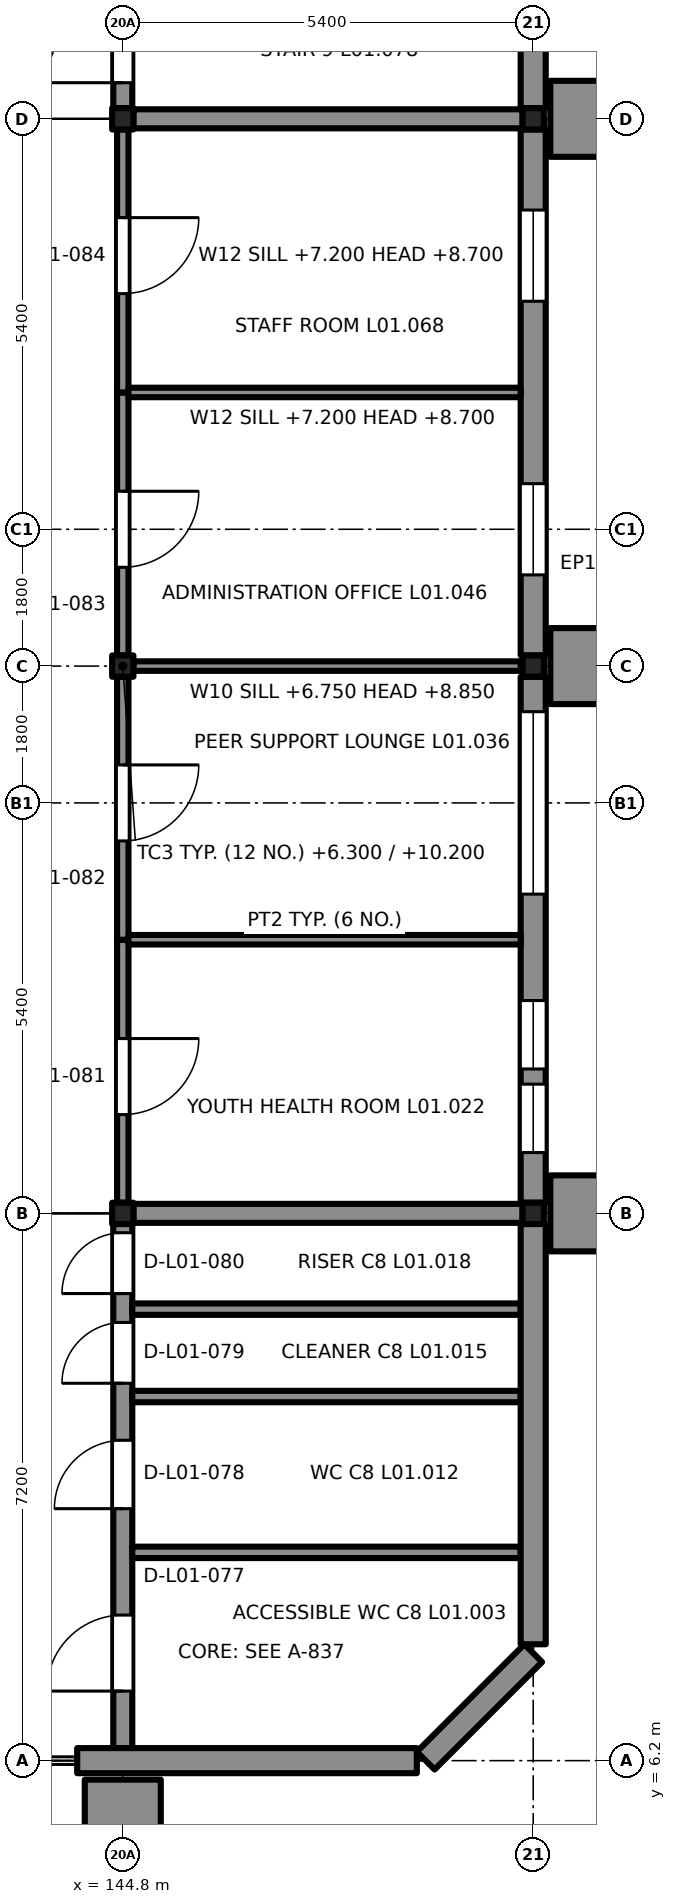
"""IFC4 building model, lengths in metres.
Left out: names, types, materials, properties, quantities, classifications, styles, units other than length and angle.
Written with IfcOpenShell. Run it as: python <this file> out.ifc"""

import sys

from ifc_helpers import new_model, si_unit, direction, frame, frame_2d, origin, origin_2d, place, context, subcontext, project, spatial, rectangle, extrude, element, fill, save


model = new_model("IFC4")
c1 = context("Model", 3, precision=1e-05, world=origin(), true_north=direction((0.0, 1.0)))
c2 = subcontext(c1, "Body", "Model", "MODEL_VIEW")
j1 = project(units=[si_unit("LENGTHUNIT", "METRE"), si_unit("PLANEANGLEUNIT", "RADIAN")], contexts=[c1])
p1 = place(None, origin())
s1 = spatial("IfcSite", under=j1, at=p1, CompositionType="ELEMENT")
p2 = place(p1, origin())
s2 = spatial("IfcBuilding", under=s1, at=p2, CompositionType="ELEMENT")
p3 = place(p2, frame((0.0, 0.0, 6.3)))
s3 = spatial("IfcBuildingStorey", under=s2, at=p3, CompositionType="ELEMENT", Elevation=6.3)
for number, where, z_axis, x_axis in (
    (1, (144.8, 13.4, 0.0), (0.0, 0.0, 1.0), (1.0, 0.0, 0.0)),
    (2, (150.2, 13.4, 0.0), (0.0, 0.0, 1.0), (1.0, 0.0, 0.0)),
    (3, (144.8, 20.6, 0.0), (0.0, 0.0, 1.0), (1.0, 0.0, 0.0)),
    (4, (150.2, 20.6, 0.0), (0.0, 0.0, 1.0), (1.0, 0.0, 0.0)),
    (5, (144.8, 27.8, 0.0), (0.0, 0.0, 1.0), (1.0, 0.0, 0.0)),
    (6, (150.2, 27.8, 0.0), (0.0, 0.0, 1.0), (1.0, 0.0, 0.0)),
):
    element("IfcColumn", number, at=place(p3, frame(where, z_axis=z_axis, x_axis=x_axis)), inside=s3, PredefinedType="COLUMN", context=c2, shape_type="SweptSolid", body=[
        extrude(rectangle(XDim=0.28, YDim=0.28, at=origin_2d()), origin(), (0.0, 0.0, 1.0), 3.9),
    ])
p4 = place(p3, frame((144.8, 6.365, 0.0), z_axis=(0.0, 0.0, 1.0), x_axis=(0.0, 1.0, 0.0)))
e7 = element("IfcWall", 7, at=p4, inside=s3, PredefinedType="SHEAR", context=c2, shape_type="SweptSolid", body=[
    extrude(rectangle(XDim=6.895, YDim=0.25, at=frame_2d((3.448, 0.0))), origin(), (0.0, 0.0, 1.0), 3.65),
])
p5 = place(p4, frame((0.75, 0.0, 0.0)))
e8 = element("IfcOpeningElement", 8, at=p5, cuts=e7, PredefinedType="OPENING", context=c2, shape_type="SweptSolid", body=[
    extrude(rectangle(XDim=1.0, YDim=2.1, at=frame_2d((0.5, 1.05))), frame((0.0, 0.135, 0.0), z_axis=(0.0, -1.0, 0.0), x_axis=(1.0, 0.0, 0.0)), (0.0, 0.0, 1.0), 0.27),
])
p6 = place(p4, frame((3.15, 0.0, 0.0)))
e9 = element("IfcOpeningElement", 9, at=p6, cuts=e7, PredefinedType="OPENING", context=c2, shape_type="SweptSolid", body=[
    extrude(rectangle(XDim=0.9, YDim=2.1, at=frame_2d((0.45, 1.05))), frame((0.0, 0.135, 0.0), z_axis=(0.0, -1.0, 0.0), x_axis=(1.0, 0.0, 0.0)), (0.0, 0.0, 1.0), 0.27),
])
p7 = place(p4, frame((4.8, 0.0, 0.0)))
e10 = element("IfcOpeningElement", 10, at=p7, cuts=e7, PredefinedType="OPENING", context=c2, shape_type="SweptSolid", body=[
    extrude(rectangle(XDim=0.8, YDim=2.1, at=frame_2d((0.4, 1.05))), frame((0.0, 0.135, 0.0), z_axis=(0.0, -1.0, 0.0), x_axis=(1.0, 0.0, 0.0)), (0.0, 0.0, 1.0), 0.27),
])
p8 = place(p4, frame((5.98, 0.0, 0.0)))
e11 = element("IfcOpeningElement", 11, at=p8, cuts=e7, PredefinedType="OPENING", context=c2, shape_type="SweptSolid", body=[
    extrude(rectangle(XDim=0.8, YDim=2.1, at=frame_2d((0.4, 1.05))), frame((0.0, 0.135, 0.0), z_axis=(0.0, -1.0, 0.0), x_axis=(1.0, 0.0, 0.0)), (0.0, 0.0, 1.0), 0.27),
])
p9 = place(p3, frame((144.94, 13.4, 0.0), z_axis=(0.0, 0.0, 1.0), x_axis=(1.0, 0.0, 0.0)))
e12 = element("IfcWall", 12, at=p9, inside=s3, PredefinedType="SHEAR", context=c2, shape_type="SweptSolid", body=[
    extrude(rectangle(XDim=5.12, YDim=0.25, at=frame_2d((2.56, 0.0))), origin(), (0.0, 0.0, 1.0), 3.65),
])
for number, where, z_axis, x_axis in (
    (13, (144.925, 8.94, 0.0), (0.0, 0.0, 1.0), (1.0, 0.0, 0.0)),
    (14, (144.925, 10.99, 0.0), (0.0, 0.0, 1.0), (1.0, 0.0, 0.0)),
    (15, (144.925, 12.14, 0.0), (0.0, 0.0, 1.0), (1.0, 0.0, 0.0)),
):
    element("IfcWall", number, at=place(p3, frame(where, z_axis=z_axis, x_axis=x_axis)), inside=s3, PredefinedType="PARTITIONING", context=c2, shape_type="SweptSolid", body=[
        extrude(rectangle(XDim=5.11, YDim=0.15, at=frame_2d((2.555, 0.0))), origin(), (0.0, 0.0, 1.0), 3.65),
    ])
p10 = place(p3, frame((144.8, 27.94, 0.0), z_axis=(0.0, 0.0, 1.0), x_axis=(0.0, 1.0, 0.0)))
e16 = element("IfcWall", 16, at=p10, inside=s3, PredefinedType="SHEAR", context=c2, shape_type="SweptSolid", body=[
    extrude(rectangle(XDim=6.92, YDim=0.25, at=frame_2d((3.46, 0.0))), origin(), (0.0, 0.0, 1.0), 3.65),
])
p11 = place(p10, frame((0.335, 0.0, 0.0)))
e17 = element("IfcOpeningElement", 17, at=p11, cuts=e16, PredefinedType="OPENING", context=c2, shape_type="SweptSolid", body=[
    extrude(rectangle(XDim=1.0, YDim=2.1, at=frame_2d((0.5, 1.05))), frame((0.0, 0.135, 0.0), z_axis=(0.0, -1.0, 0.0), x_axis=(1.0, 0.0, 0.0)), (0.0, 0.0, 1.0), 0.27),
])
p12 = place(p3, frame((144.94, 27.8, 0.0), z_axis=(0.0, 0.0, 1.0), x_axis=(1.0, 0.0, 0.0)))
e18 = element("IfcWall", 18, at=p12, inside=s3, PredefinedType="SHEAR", context=c2, shape_type="SweptSolid", body=[
    extrude(rectangle(XDim=5.12, YDim=0.25, at=frame_2d((2.56, 0.0))), origin(), (0.0, 0.0, 1.0), 3.65),
])
p13 = place(p3, frame((150.2, 13.26, 0.0), z_axis=(0.0, 0.0, 1.0), x_axis=(0.0, -1.0, 0.0)))
e19 = element("IfcWall", 19, at=p13, inside=s3, PredefinedType="SOLIDWALL", context=c2, shape_type="SweptSolid", body=[
    extrude(rectangle(XDim=5.529, YDim=0.33, at=frame_2d((2.765, 0.0))), origin(), (0.0, 0.0, 1.0), 3.22),
])
p14 = place(p3, frame((150.2, 20.46, 0.0), z_axis=(0.0, 0.0, 1.0), x_axis=(0.0, -1.0, 0.0)))
e20 = element("IfcWall", 20, at=p14, inside=s3, PredefinedType="SOLIDWALL", context=c2, shape_type="SweptSolid", body=[
    extrude(rectangle(XDim=6.92, YDim=0.33, at=frame_2d((3.46, 0.0))), origin(), (0.0, 0.0, 1.0), 3.22),
])
p15 = place(p14, frame((5.36, 0.0, 0.6)))
e21 = element("IfcOpeningElement", 21, at=p15, cuts=e20, PredefinedType="OPENING", context=c2, shape_type="SweptSolid", body=[
    extrude(rectangle(XDim=0.9, YDim=2.4, at=frame_2d((0.45, 1.2))), frame((0.0, 0.175, 0.0), z_axis=(0.0, -1.0, 0.0), x_axis=(1.0, 0.0, 0.0)), (0.0, 0.0, 1.0), 0.35),
])
p16 = place(p14, frame((4.26, 0.0, 0.6)))
e22 = element("IfcOpeningElement", 22, at=p16, cuts=e20, PredefinedType="OPENING", context=c2, shape_type="SweptSolid", body=[
    extrude(rectangle(XDim=0.9, YDim=2.4, at=frame_2d((0.45, 1.2))), frame((0.0, 0.175, 0.0), z_axis=(0.0, -1.0, 0.0), x_axis=(1.0, 0.0, 0.0)), (0.0, 0.0, 1.0), 0.35),
])
p17 = place(p14, frame((0.46, 0.0, 0.45)))
e23 = element("IfcOpeningElement", 23, at=p17, cuts=e20, PredefinedType="OPENING", context=c2, shape_type="SweptSolid", body=[
    extrude(rectangle(XDim=2.4, YDim=2.1, at=frame_2d((1.2, 1.05))), frame((0.0, 0.175, 0.0), z_axis=(0.0, -1.0, 0.0), x_axis=(1.0, 0.0, 0.0)), (0.0, 0.0, 1.0), 0.35),
])
p18 = place(p3, frame((150.2, 27.66, 0.0), z_axis=(0.0, 0.0, 1.0), x_axis=(0.0, -1.0, 0.0)))
e24 = element("IfcWall", 24, at=p18, inside=s3, PredefinedType="SOLIDWALL", context=c2, shape_type="SweptSolid", body=[
    extrude(rectangle(XDim=6.92, YDim=0.33, at=frame_2d((3.46, 0.0))), origin(), (0.0, 0.0, 1.0), 3.22),
])
p19 = place(p18, frame((4.66, 0.0, 0.9)))
e25 = element("IfcOpeningElement", 25, at=p19, cuts=e24, PredefinedType="OPENING", context=c2, shape_type="SweptSolid", body=[
    extrude(rectangle(XDim=1.2, YDim=1.5, at=frame_2d((0.6, 0.75))), frame((0.0, 0.175, 0.0), z_axis=(0.0, -1.0, 0.0), x_axis=(1.0, 0.0, 0.0)), (0.0, 0.0, 1.0), 0.35),
])
p20 = place(p18, frame((1.06, 0.0, 0.9)))
e26 = element("IfcOpeningElement", 26, at=p20, cuts=e24, PredefinedType="OPENING", context=c2, shape_type="SweptSolid", body=[
    extrude(rectangle(XDim=1.2, YDim=1.5, at=frame_2d((0.6, 0.75))), frame((0.0, 0.175, 0.0), z_axis=(0.0, -1.0, 0.0), x_axis=(1.0, 0.0, 0.0)), (0.0, 0.0, 1.0), 0.35),
])
p21 = place(p3, frame((150.2, 30.7, 0.0), z_axis=(0.0, 0.0, 1.0), x_axis=(0.0, -1.0, 0.0)))
e27 = element("IfcWall", 27, at=p21, inside=s3, PredefinedType="SOLIDWALL", context=c2, shape_type="SweptSolid", body=[
    extrude(rectangle(XDim=2.76, YDim=0.33, at=frame_2d((1.38, 0.0))), origin(), (0.0, 0.0, 1.0), 3.22),
])
for number, where, z_axis, x_axis in (
    (28, (150.8, 13.9, 0.0), (0.0, 0.0, 1.0), (0.0, -1.0, 0.0)),
    (29, (150.8, 21.1, 0.0), (0.0, 0.0, 1.0), (0.0, -1.0, 0.0)),
    (30, (150.8, 28.3, 0.0), (0.0, 0.0, 1.0), (0.0, -1.0, 0.0)),
):
    element("IfcWall", number, at=place(p3, frame(where, z_axis=z_axis, x_axis=x_axis)), inside=s3, PredefinedType="SOLIDWALL", context=c2, shape_type="SweptSolid", body=[
        extrude(rectangle(XDim=1.0, YDim=0.75, at=frame_2d((0.5, 0.0))), origin(), (0.0, 0.0, 1.0), 3.9),
    ])
p22 = place(p3, frame((148.669, 6.2, 0.0), z_axis=(0.0, 0.0, 1.0), x_axis=(-1.0, 0.0, 0.0)))
e31 = element("IfcWall", 31, at=p22, inside=s3, PredefinedType="SOLIDWALL", context=c2, shape_type="SweptSolid", body=[
    extrude(rectangle(XDim=4.469, YDim=0.33, at=frame_2d((2.234, 0.0))), origin(), (0.0, 0.0, 1.0), 3.2),
])
p23 = place(p3, frame((145.3, 5.575, 0.0), z_axis=(0.0, 0.0, 1.0), x_axis=(-1.0, 0.0, 0.0)))
e32 = element("IfcWall", 32, at=p23, inside=s3, PredefinedType="SOLIDWALL", context=c2, shape_type="SweptSolid", body=[
    extrude(rectangle(XDim=1.0, YDim=0.75, at=frame_2d((0.5, 0.0))), origin(), (0.0, 0.0, 1.0), 3.9),
])
p24 = place(p3, frame((150.2, 7.614, 0.0), z_axis=(0.0, 0.0, 1.0), x_axis=(-0.707106781187, -0.707106781187, 0.0)))
e33 = element("IfcWall", 33, at=p24, inside=s3, PredefinedType="SOLIDWALL", context=c2, shape_type="SweptSolid", body=[
    extrude(rectangle(XDim=2.0, YDim=0.33, at=frame_2d((1.0, 0.0))), origin(), (0.0, 0.0, 1.0), 3.2),
])
p25 = place(p3, frame((144.8, 17.0, 0.0), z_axis=(0.0, 0.0, 1.0), x_axis=(0.0, -1.0, 0.0)))
e34 = element("IfcWall", 34, at=p25, inside=s3, PredefinedType="PARTITIONING", context=c2, shape_type="SweptSolid", body=[
    extrude(rectangle(XDim=3.46, YDim=0.15, at=frame_2d((1.73, 0.0))), origin(), (0.0, 0.0, 1.0), 3.22),
])
p26 = place(p25, frame((1.3, 0.0, 0.0)))
e35 = element("IfcOpeningElement", 35, at=p26, cuts=e34, PredefinedType="OPENING", context=c2, shape_type="SweptSolid", body=[
    extrude(rectangle(XDim=1.0, YDim=2.1, at=frame_2d((0.5, 1.05))), frame((0.0, 0.085, 0.0), z_axis=(0.0, -1.0, 0.0), x_axis=(1.0, 0.0, 0.0)), (0.0, 0.0, 1.0), 0.17),
])
p27 = place(p3, frame((144.8, 20.46, 0.0), z_axis=(0.0, 0.0, 1.0), x_axis=(0.0, -1.0, 0.0)))
e36 = element("IfcWall", 36, at=p27, inside=s3, PredefinedType="PARTITIONING", context=c2, shape_type="SweptSolid", body=[
    extrude(rectangle(XDim=3.46, YDim=0.15, at=frame_2d((1.73, 0.0))), origin(), (0.0, 0.0, 1.0), 3.22),
])
p28 = place(p27, frame((1.16, 0.0, 0.0)))
e37 = element("IfcOpeningElement", 37, at=p28, cuts=e36, PredefinedType="OPENING", context=c2, shape_type="SweptSolid", body=[
    extrude(rectangle(XDim=1.0, YDim=2.1, at=frame_2d((0.5, 1.05))), frame((0.0, 0.085, 0.0), z_axis=(0.0, -1.0, 0.0), x_axis=(1.0, 0.0, 0.0)), (0.0, 0.0, 1.0), 0.17),
])
p29 = place(p3, frame((150.035, 17.0, 0.0), z_axis=(0.0, 0.0, 1.0), x_axis=(-1.0, 0.0, 0.0)))
e38 = element("IfcWall", 38, at=p29, inside=s3, PredefinedType="PARTITIONING", context=c2, shape_type="SweptSolid", body=[
    extrude(rectangle(XDim=5.16, YDim=0.125, at=frame_2d((2.58, 0.0))), origin(), (0.0, 0.0, 1.0), 3.38),
])
p30 = place(p3, frame((144.8, 24.2, 0.0), z_axis=(0.0, 0.0, 1.0), x_axis=(0.0, -1.0, 0.0)))
e39 = element("IfcWall", 39, at=p30, inside=s3, PredefinedType="PARTITIONING", context=c2, shape_type="SweptSolid", body=[
    extrude(rectangle(XDim=3.46, YDim=0.15, at=frame_2d((1.73, 0.0))), origin(), (0.0, 0.0, 1.0), 3.22),
])
p31 = place(p30, frame((1.3, 0.0, 0.0)))
e40 = element("IfcOpeningElement", 40, at=p31, cuts=e39, PredefinedType="OPENING", context=c2, shape_type="SweptSolid", body=[
    extrude(rectangle(XDim=1.0, YDim=2.1, at=frame_2d((0.5, 1.05))), frame((0.0, 0.085, 0.0), z_axis=(0.0, -1.0, 0.0), x_axis=(1.0, 0.0, 0.0)), (0.0, 0.0, 1.0), 0.17),
])
p32 = place(p3, frame((150.035, 20.6, 0.0), z_axis=(0.0, 0.0, 1.0), x_axis=(-1.0, 0.0, 0.0)))
e41 = element("IfcWall", 41, at=p32, inside=s3, PredefinedType="PARTITIONING", context=c2, shape_type="SweptSolid", body=[
    extrude(rectangle(XDim=5.095, YDim=0.125, at=frame_2d((2.547, 0.0))), origin(), (0.0, 0.0, 1.0), 3.38),
])
p33 = place(p3, frame((144.8, 27.66, 0.0), z_axis=(0.0, 0.0, 1.0), x_axis=(0.0, -1.0, 0.0)))
e42 = element("IfcWall", 42, at=p33, inside=s3, PredefinedType="PARTITIONING", context=c2, shape_type="SweptSolid", body=[
    extrude(rectangle(XDim=3.46, YDim=0.15, at=frame_2d((1.73, 0.0))), origin(), (0.0, 0.0, 1.0), 3.22),
])
p34 = place(p33, frame((1.16, 0.0, 0.0)))
e43 = element("IfcOpeningElement", 43, at=p34, cuts=e42, PredefinedType="OPENING", context=c2, shape_type="SweptSolid", body=[
    extrude(rectangle(XDim=1.0, YDim=2.1, at=frame_2d((0.5, 1.05))), frame((0.0, 0.085, 0.0), z_axis=(0.0, -1.0, 0.0), x_axis=(1.0, 0.0, 0.0)), (0.0, 0.0, 1.0), 0.17),
])
p35 = place(p3, frame((150.035, 24.2, 0.0), z_axis=(0.0, 0.0, 1.0), x_axis=(-1.0, 0.0, 0.0)))
e44 = element("IfcWall", 44, at=p35, inside=s3, PredefinedType="PARTITIONING", context=c2, shape_type="SweptSolid", body=[
    extrude(rectangle(XDim=5.16, YDim=0.125, at=frame_2d((2.58, 0.0))), origin(), (0.0, 0.0, 1.0), 3.38),
])
p36 = place(p5, origin())
e45 = element("IfcDoor", 45, at=p36, inside=s3, OperationType="SINGLE_SWING_LEFT", PredefinedType="DOOR", context=c2, shape_type="SweptSolid", body=[
    extrude(rectangle(XDim=1.0, YDim=2.1, at=frame_2d((0.5, 1.05))), frame((0.0, 0.025, 0.0), z_axis=(0.0, -1.0, 0.0), x_axis=(1.0, 0.0, 0.0)), (0.0, 0.0, 1.0), 0.05),
])
fill(e8, e45)
p37 = place(p6, origin())
e46 = element("IfcDoor", 46, at=p37, inside=s3, OperationType="SINGLE_SWING_LEFT", PredefinedType="DOOR", context=c2, shape_type="SweptSolid", body=[
    extrude(rectangle(XDim=0.9, YDim=2.1, at=frame_2d((0.45, 1.05))), frame((0.0, 0.025, 0.0), z_axis=(0.0, -1.0, 0.0), x_axis=(1.0, 0.0, 0.0)), (0.0, 0.0, 1.0), 0.05),
])
fill(e9, e46)
p38 = place(p7, origin())
e47 = element("IfcDoor", 47, at=p38, inside=s3, OperationType="SINGLE_SWING_LEFT", PredefinedType="DOOR", context=c2, shape_type="SweptSolid", body=[
    extrude(rectangle(XDim=0.8, YDim=2.1, at=frame_2d((0.4, 1.05))), frame((0.0, 0.025, 0.0), z_axis=(0.0, -1.0, 0.0), x_axis=(1.0, 0.0, 0.0)), (0.0, 0.0, 1.0), 0.05),
])
fill(e10, e47)
p39 = place(p8, origin())
e48 = element("IfcDoor", 48, at=p39, inside=s3, OperationType="SINGLE_SWING_LEFT", PredefinedType="DOOR", context=c2, shape_type="SweptSolid", body=[
    extrude(rectangle(XDim=0.8, YDim=2.1, at=frame_2d((0.4, 1.05))), frame((0.0, 0.025, 0.0), z_axis=(0.0, -1.0, 0.0), x_axis=(1.0, 0.0, 0.0)), (0.0, 0.0, 1.0), 0.05),
])
fill(e11, e48)
p40 = place(p11, origin())
e49 = element("IfcDoor", 49, at=p40, inside=s3, OperationType="SINGLE_SWING_LEFT", PredefinedType="DOOR", context=c2, shape_type="SweptSolid", body=[
    extrude(rectangle(XDim=1.0, YDim=2.1, at=frame_2d((0.5, 1.05))), frame((0.0, 0.025, 0.0), z_axis=(0.0, -1.0, 0.0), x_axis=(1.0, 0.0, 0.0)), (0.0, 0.0, 1.0), 0.05),
])
fill(e17, e49)
p41 = place(p15, origin())
e50 = element("IfcWindow", 50, at=p41, inside=s3, PartitioningType="SINGLE_PANEL", PredefinedType="WINDOW", context=c2, shape_type="SweptSolid", body=[
    extrude(rectangle(XDim=0.9, YDim=2.4, at=frame_2d((0.45, 1.2))), frame((0.0, -0.03, 0.0), z_axis=(0.0, -1.0, 0.0), x_axis=(1.0, 0.0, 0.0)), (0.0, 0.0, 1.0), 0.06),
])
fill(e21, e50)
p42 = place(p16, origin())
e51 = element("IfcWindow", 51, at=p42, inside=s3, PartitioningType="SINGLE_PANEL", PredefinedType="WINDOW", context=c2, shape_type="SweptSolid", body=[
    extrude(rectangle(XDim=0.9, YDim=2.4, at=frame_2d((0.45, 1.2))), frame((0.0, -0.03, 0.0), z_axis=(0.0, -1.0, 0.0), x_axis=(1.0, 0.0, 0.0)), (0.0, 0.0, 1.0), 0.06),
])
fill(e22, e51)
p43 = place(p17, origin())
e52 = element("IfcWindow", 52, at=p43, inside=s3, PartitioningType="SINGLE_PANEL", PredefinedType="WINDOW", context=c2, shape_type="SweptSolid", body=[
    extrude(rectangle(XDim=2.4, YDim=2.1, at=frame_2d((1.2, 1.05))), frame((0.0, -0.03, 0.0), z_axis=(0.0, -1.0, 0.0), x_axis=(1.0, 0.0, 0.0)), (0.0, 0.0, 1.0), 0.06),
])
fill(e23, e52)
p44 = place(p19, origin())
e53 = element("IfcWindow", 53, at=p44, inside=s3, PartitioningType="SINGLE_PANEL", PredefinedType="WINDOW", context=c2, shape_type="SweptSolid", body=[
    extrude(rectangle(XDim=1.2, YDim=1.5, at=frame_2d((0.6, 0.75))), frame((0.0, -0.03, 0.0), z_axis=(0.0, -1.0, 0.0), x_axis=(1.0, 0.0, 0.0)), (0.0, 0.0, 1.0), 0.06),
])
fill(e25, e53)
p45 = place(p20, origin())
e54 = element("IfcWindow", 54, at=p45, inside=s3, PartitioningType="SINGLE_PANEL", PredefinedType="WINDOW", context=c2, shape_type="SweptSolid", body=[
    extrude(rectangle(XDim=1.2, YDim=1.5, at=frame_2d((0.6, 0.75))), frame((0.0, -0.03, 0.0), z_axis=(0.0, -1.0, 0.0), x_axis=(1.0, 0.0, 0.0)), (0.0, 0.0, 1.0), 0.06),
])
fill(e26, e54)
p46 = place(p26, origin())
e55 = element("IfcDoor", 55, at=p46, inside=s3, OperationType="SINGLE_SWING_RIGHT", PredefinedType="DOOR", context=c2, shape_type="SweptSolid", body=[
    extrude(rectangle(XDim=1.0, YDim=2.1, at=frame_2d((0.5, 1.05))), frame((0.0, 0.025, 0.0), z_axis=(0.0, -1.0, 0.0), x_axis=(1.0, 0.0, 0.0)), (0.0, 0.0, 1.0), 0.05),
])
fill(e35, e55)
p47 = place(p28, origin())
e56 = element("IfcDoor", 56, at=p47, inside=s3, OperationType="SINGLE_SWING_LEFT", PredefinedType="DOOR", context=c2, shape_type="SweptSolid", body=[
    extrude(rectangle(XDim=1.0, YDim=2.1, at=frame_2d((0.5, 1.05))), frame((0.0, 0.025, 0.0), z_axis=(0.0, -1.0, 0.0), x_axis=(1.0, 0.0, 0.0)), (0.0, 0.0, 1.0), 0.05),
])
fill(e37, e56)
p48 = place(p31, origin())
e57 = element("IfcDoor", 57, at=p48, inside=s3, OperationType="SINGLE_SWING_RIGHT", PredefinedType="DOOR", context=c2, shape_type="SweptSolid", body=[
    extrude(rectangle(XDim=1.0, YDim=2.1, at=frame_2d((0.5, 1.05))), frame((0.0, 0.025, 0.0), z_axis=(0.0, -1.0, 0.0), x_axis=(1.0, 0.0, 0.0)), (0.0, 0.0, 1.0), 0.05),
])
fill(e40, e57)
p49 = place(p34, origin())
e58 = element("IfcDoor", 58, at=p49, inside=s3, OperationType="SINGLE_SWING_LEFT", PredefinedType="DOOR", context=c2, shape_type="SweptSolid", body=[
    extrude(rectangle(XDim=1.0, YDim=2.1, at=frame_2d((0.5, 1.05))), frame((0.0, 0.025, 0.0), z_axis=(0.0, -1.0, 0.0), x_axis=(1.0, 0.0, 0.0)), (0.0, 0.0, 1.0), 0.05),
])
fill(e43, e58)
save(model, sys.argv[1])
